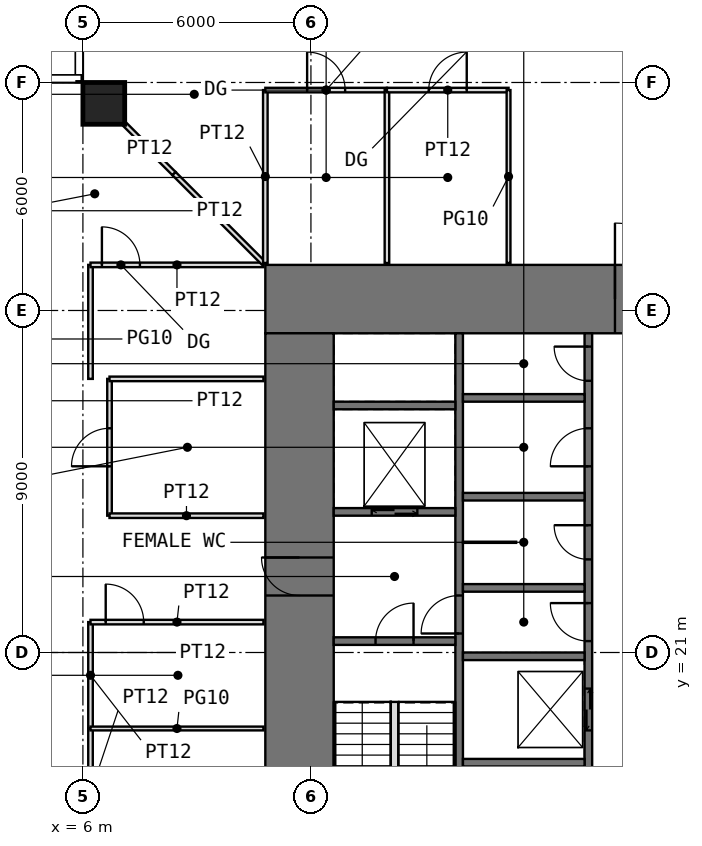
"""IFC4 building model, lengths in metres.
Left out: names, types, materials, properties, quantities, classifications, styles, units other than length and angle.
Written with IfcOpenShell. Run it as: python <this file> out.ifc"""

import sys

from ifc_helpers import new_model, si_unit, direction, frame, frame_2d, origin, origin_2d, place, context, subcontext, project, spatial, rectangle, extrude, element, fill, save


model = new_model("IFC4")
c1 = context("Model", 3, precision=1e-05, world=origin(), true_north=direction((0.0, 1.0)))
c2 = subcontext(c1, "Body", "Model", "MODEL_VIEW")
j1 = project(units=[si_unit("LENGTHUNIT", "METRE"), si_unit("PLANEANGLEUNIT", "RADIAN")], contexts=[c1])
p1 = place(None, origin())
s1 = spatial("IfcSite", under=j1, at=p1, CompositionType="ELEMENT")
p2 = place(p1, origin())
s2 = spatial("IfcBuilding", under=s1, at=p2, CompositionType="ELEMENT")
p3 = place(p2, frame((0.0, 0.0, 82.5)))
s3 = spatial("IfcBuildingStorey", under=s2, at=p3, CompositionType="ELEMENT", Elevation=82.5)
p4 = place(p3, frame((6.55, 35.45, 0.0), z_axis=(0.0, 0.0, 1.0), x_axis=(1.0, 0.0, 0.0)))
e1 = element("IfcColumn", 1, at=p4, inside=s3, PredefinedType="COLUMN", context=c2, shape_type="SweptSolid", body=[
    extrude(rectangle(XDim=1.1, YDim=1.1, at=origin_2d()), origin(), (0.0, 0.0, 1.0), 4.0),
])
p5 = place(p3, frame((10.8, 30.3, -0.05), z_axis=(0.0, 0.0, 1.0), x_axis=(1.0, 0.0, 0.0)))
e2 = element("IfcWall", 2, at=p5, inside=s3, PredefinedType="SHEAR", context=c2, shape_type="SweptSolid", body=[
    extrude(rectangle(XDim=20.4, YDim=1.8, at=frame_2d((10.2, 0.0))), origin(), (0.0, 0.0, 1.0), 3.8),
])
p6 = place(p5, frame((9.2, 0.0, 0.05)))
e3 = element("IfcOpeningElement", 3, at=p6, cuts=e2, PredefinedType="OPENING", context=c2, shape_type="SweptSolid", body=[
    extrude(rectangle(XDim=2.0, YDim=2.2, at=frame_2d((1.0, 1.1))), frame((0.0, 0.91, 0.0), z_axis=(0.0, -1.0, 0.0), x_axis=(1.0, 0.0, 0.0)), (0.0, 0.0, 1.0), 1.82),
])
p7 = place(p3, frame((11.7, 12.6, -0.05), z_axis=(0.0, 0.0, 1.0), x_axis=(0.0, 1.0, 0.0)))
e4 = element("IfcWall", 4, at=p7, inside=s3, PredefinedType="SHEAR", context=c2, shape_type="SweptSolid", body=[
    extrude(rectangle(XDim=16.8, YDim=1.8, at=frame_2d((8.4, 0.0))), origin(), (0.0, 0.0, 1.0), 3.8),
])
p8 = place(p7, frame((9.9, 0.0, 0.05)))
e5 = element("IfcOpeningElement", 5, at=p8, cuts=e4, PredefinedType="OPENING", context=c2, shape_type="SweptSolid", body=[
    extrude(rectangle(XDim=1.0, YDim=2.2, at=frame_2d((0.5, 1.1))), frame((0.0, 0.91, 0.0), z_axis=(0.0, -1.0, 0.0), x_axis=(1.0, 0.0, 0.0)), (0.0, 0.0, 1.0), 1.82),
])
p9 = place(p3, frame((15.9, 12.6, -0.05), z_axis=(0.0, 0.0, 1.0), x_axis=(0.0, 1.0, 0.0)))
e6 = element("IfcWall", 6, at=p9, inside=s3, PredefinedType="SHEAR", context=c2, shape_type="SweptSolid", body=[
    extrude(rectangle(XDim=16.8, YDim=0.2, at=frame_2d((8.4, 0.0))), origin(), (0.0, 0.0, 1.0), 3.8),
])
p10 = place(p9, frame((8.9, 0.0, 0.05)))
e7 = element("IfcOpeningElement", 7, at=p10, cuts=e6, PredefinedType="OPENING", context=c2, shape_type="SweptSolid", body=[
    extrude(rectangle(XDim=1.0, YDim=2.2, at=frame_2d((0.5, 1.1))), frame((0.0, 0.11, 0.0), z_axis=(0.0, -1.0, 0.0), x_axis=(1.0, 0.0, 0.0)), (0.0, 0.0, 1.0), 0.22),
])
p11 = place(p3, frame((19.3, 12.6, -0.05), z_axis=(0.0, 0.0, 1.0), x_axis=(0.0, 1.0, 0.0)))
e8 = element("IfcWall", 8, at=p11, inside=s3, PredefinedType="SHEAR", context=c2, shape_type="SweptSolid", body=[
    extrude(rectangle(XDim=16.8, YDim=0.2, at=frame_2d((8.4, 0.0))), origin(), (0.0, 0.0, 1.0), 3.8),
])
p12 = place(p11, frame((8.7, 0.0, 0.05)))
e9 = element("IfcOpeningElement", 9, at=p12, cuts=e8, PredefinedType="OPENING", context=c2, shape_type="SweptSolid", body=[
    extrude(rectangle(XDim=1.0, YDim=2.2, at=frame_2d((0.5, 1.1))), frame((0.0, 0.11, 0.0), z_axis=(0.0, -1.0, 0.0), x_axis=(1.0, 0.0, 0.0)), (0.0, 0.0, 1.0), 0.22),
])
p13 = place(p11, frame((10.85, 0.0, 0.05)))
e10 = element("IfcOpeningElement", 10, at=p13, cuts=e8, PredefinedType="OPENING", context=c2, shape_type="SweptSolid", body=[
    extrude(rectangle(XDim=0.9, YDim=2.2, at=frame_2d((0.45, 1.1))), frame((0.0, 0.11, 0.0), z_axis=(0.0, -1.0, 0.0), x_axis=(1.0, 0.0, 0.0)), (0.0, 0.0, 1.0), 0.22),
])
p14 = place(p11, frame((13.3, 0.0, 0.05)))
e11 = element("IfcOpeningElement", 11, at=p14, cuts=e8, PredefinedType="OPENING", context=c2, shape_type="SweptSolid", body=[
    extrude(rectangle(XDim=1.0, YDim=2.2, at=frame_2d((0.5, 1.1))), frame((0.0, 0.11, 0.0), z_axis=(0.0, -1.0, 0.0), x_axis=(1.0, 0.0, 0.0)), (0.0, 0.0, 1.0), 0.22),
])
p15 = place(p11, frame((15.55, 0.0, 0.05)))
e12 = element("IfcOpeningElement", 12, at=p15, cuts=e8, PredefinedType="OPENING", context=c2, shape_type="SweptSolid", body=[
    extrude(rectangle(XDim=0.9, YDim=2.2, at=frame_2d((0.45, 1.1))), frame((0.0, 0.11, 0.0), z_axis=(0.0, -1.0, 0.0), x_axis=(1.0, 0.0, 0.0)), (0.0, 0.0, 1.0), 0.22),
])
p16 = place(p11, frame((0.75, 0.0, 0.05)))
e13 = element("IfcOpeningElement", 13, at=p16, cuts=e8, PredefinedType="OPENING", context=c2, shape_type="SweptSolid", body=[
    extrude(rectangle(XDim=1.1, YDim=2.2, at=frame_2d((0.55, 1.1))), frame((0.0, 0.11, 0.0), z_axis=(0.0, -1.0, 0.0), x_axis=(1.0, 0.0, 0.0)), (0.0, 0.0, 1.0), 0.22),
])
p17 = place(p11, frame((3.55, 0.0, 0.05)))
e14 = element("IfcOpeningElement", 14, at=p17, cuts=e8, PredefinedType="OPENING", context=c2, shape_type="SweptSolid", body=[
    extrude(rectangle(XDim=1.1, YDim=2.2, at=frame_2d((0.55, 1.1))), frame((0.0, 0.11, 0.0), z_axis=(0.0, -1.0, 0.0), x_axis=(1.0, 0.0, 0.0)), (0.0, 0.0, 1.0), 0.22),
])
p18 = place(p11, frame((6.35, 0.0, 0.05)))
e15 = element("IfcOpeningElement", 15, at=p18, cuts=e8, PredefinedType="OPENING", context=c2, shape_type="SweptSolid", body=[
    extrude(rectangle(XDim=1.1, YDim=2.2, at=frame_2d((0.55, 1.1))), frame((0.0, 0.11, 0.0), z_axis=(0.0, -1.0, 0.0), x_axis=(1.0, 0.0, 0.0)), (0.0, 0.0, 1.0), 0.22),
])
p19 = place(p3, frame((12.6, 21.3, -0.05), z_axis=(0.0, 0.0, 1.0), x_axis=(1.0, 0.0, 0.0)))
e16 = element("IfcWall", 16, at=p19, inside=s3, PredefinedType="SHEAR", context=c2, shape_type="SweptSolid", body=[
    extrude(rectangle(XDim=3.2, YDim=0.2, at=frame_2d((1.6, 0.0))), origin(), (0.0, 0.0, 1.0), 3.8),
])
p20 = place(p19, frame((1.1, 0.0, 0.05)))
e17 = element("IfcOpeningElement", 17, at=p20, cuts=e16, PredefinedType="OPENING", context=c2, shape_type="SweptSolid", body=[
    extrude(rectangle(XDim=1.0, YDim=2.2, at=frame_2d((0.5, 1.1))), frame((0.0, 0.11, 0.0), z_axis=(0.0, -1.0, 0.0), x_axis=(1.0, 0.0, 0.0)), (0.0, 0.0, 1.0), 0.22),
])
p21 = place(p3, frame((12.6, 24.7, -0.05), z_axis=(0.0, 0.0, 1.0), x_axis=(1.0, 0.0, 0.0)))
e18 = element("IfcWall", 18, at=p21, inside=s3, PredefinedType="SHEAR", context=c2, shape_type="SweptSolid", body=[
    extrude(rectangle(XDim=3.2, YDim=0.2, at=frame_2d((1.6, 0.0))), origin(), (0.0, 0.0, 1.0), 3.8),
])
p22 = place(p21, frame((1.0, 0.0, 0.05)))
e19 = element("IfcOpeningElement", 19, at=p22, cuts=e18, PredefinedType="OPENING", context=c2, shape_type="SweptSolid", body=[
    extrude(rectangle(XDim=1.2, YDim=2.2, at=frame_2d((0.6, 1.1))), frame((0.0, 0.11, 0.0), z_axis=(0.0, -1.0, 0.0), x_axis=(1.0, 0.0, 0.0)), (0.0, 0.0, 1.0), 0.22),
])
for number, where, z_axis, x_axis in (
    (20, (12.6, 27.5, -0.05), (0.0, 0.0, 1.0), (1.0, 0.0, 0.0)),
    (21, (16.0, 18.1, -0.05), (0.0, 0.0, 1.0), (1.0, 0.0, 0.0)),
    (22, (16.0, 20.9, -0.05), (0.0, 0.0, 1.0), (1.0, 0.0, 0.0)),
    (23, (16.0, 22.7, -0.05), (0.0, 0.0, 1.0), (1.0, 0.0, 0.0)),
    (24, (16.0, 25.1, -0.05), (0.0, 0.0, 1.0), (1.0, 0.0, 0.0)),
    (25, (16.0, 27.7, -0.05), (0.0, 0.0, 1.0), (1.0, 0.0, 0.0)),
):
    element("IfcWall", number, at=place(p3, frame(where, z_axis=z_axis, x_axis=x_axis)), inside=s3, PredefinedType="SHEAR", context=c2, shape_type="SweptSolid", body=[
        extrude(rectangle(XDim=3.2, YDim=0.2, at=frame_2d((1.6, 0.0))), origin(), (0.0, 0.0, 1.0), 3.8),
    ])
p23 = place(p3, frame((16.0, 23.9, 0.0), z_axis=(0.0, 0.0, 1.0), x_axis=(1.0, 0.0, 0.0)))
e26 = element("IfcWall", 26, at=p23, inside=s3, PredefinedType="PARTITIONING", context=c2, shape_type="SweptSolid", body=[
    extrude(rectangle(XDim=1.4, YDim=0.03, at=frame_2d((0.7, 0.0))), origin(), (0.0, 0.0, 1.0), 3.55),
])
p24 = place(p3, frame((6.2, 15.6, 0.0), z_axis=(0.0, 0.0, 1.0), x_axis=(0.0, 1.0, 0.0)))
e27 = element("IfcWall", 27, at=p24, inside=s3, PredefinedType="PARTITIONING", context=c2, shape_type="SweptSolid", body=[
    extrude(rectangle(XDim=3.4, YDim=0.12, at=frame_2d((1.7, 0.0))), origin(), (0.0, 0.0, 1.0), 3.55),
])
p25 = place(p24, frame((1.2, 0.0, 0.0)))
e28 = element("IfcOpeningElement", 28, at=p25, cuts=e27, PredefinedType="OPENING", context=c2, shape_type="SweptSolid", body=[
    extrude(rectangle(XDim=1.0, YDim=2.4, at=frame_2d((0.5, 1.2))), frame((0.0, 0.07, 0.0), z_axis=(0.0, -1.0, 0.0), x_axis=(1.0, 0.0, 0.0)), (0.0, 0.0, 1.0), 0.14),
])
p26 = place(p3, frame((6.2, 19.0, 0.0), z_axis=(0.0, 0.0, 1.0), x_axis=(0.0, 1.0, 0.0)))
e29 = element("IfcWall", 29, at=p26, inside=s3, PredefinedType="PARTITIONING", context=c2, shape_type="SweptSolid", body=[
    extrude(rectangle(XDim=2.8, YDim=0.12, at=frame_2d((1.4, 0.0))), origin(), (0.0, 0.0, 1.0), 3.55),
])
p27 = place(p3, frame((6.2, 19.0, 0.0), z_axis=(0.0, 0.0, 1.0), x_axis=(1.0, 0.0, 0.0)))
e30 = element("IfcWall", 30, at=p27, inside=s3, PredefinedType="PARTITIONING", context=c2, shape_type="SweptSolid", body=[
    extrude(rectangle(XDim=4.55, YDim=0.1, at=frame_2d((2.275, 0.0))), origin(), (0.0, 0.0, 1.0), 3.55),
])
p28 = place(p3, frame((6.2, 21.8, 0.0), z_axis=(0.0, 0.0, 1.0), x_axis=(1.0, 0.0, 0.0)))
e31 = element("IfcWall", 31, at=p28, inside=s3, PredefinedType="PARTITIONING", context=c2, shape_type="SweptSolid", body=[
    extrude(rectangle(XDim=4.55, YDim=0.12, at=frame_2d((2.275, 0.0))), origin(), (0.0, 0.0, 1.0), 3.55),
])
p29 = place(p28, frame((0.4, 0.0, 0.0)))
e32 = element("IfcOpeningElement", 32, at=p29, cuts=e31, PredefinedType="OPENING", context=c2, shape_type="SweptSolid", body=[
    extrude(rectangle(XDim=1.0, YDim=2.4, at=frame_2d((0.5, 1.2))), frame((0.0, 0.07, 0.0), z_axis=(0.0, -1.0, 0.0), x_axis=(1.0, 0.0, 0.0)), (0.0, 0.0, 1.0), 0.14),
])
p30 = place(p3, frame((6.2, 28.2, 0.0), z_axis=(0.0, 0.0, 1.0), x_axis=(0.0, 1.0, 0.0)))
e33 = element("IfcWall", 33, at=p30, inside=s3, PredefinedType="PARTITIONING", context=c2, shape_type="SweptSolid", body=[
    extrude(rectangle(XDim=3.0, YDim=0.12, at=frame_2d((1.5, 0.0))), origin(), (0.0, 0.0, 1.0), 3.55),
])
p31 = place(p3, frame((6.2, 31.2, 0.0), z_axis=(0.0, 0.0, 1.0), x_axis=(1.0, 0.0, 0.0)))
e34 = element("IfcWall", 34, at=p31, inside=s3, PredefinedType="PARTITIONING", context=c2, shape_type="SweptSolid", body=[
    extrude(rectangle(XDim=4.55, YDim=0.12, at=frame_2d((2.275, 0.0))), origin(), (0.0, 0.0, 1.0), 3.55),
])
p32 = place(p31, frame((0.3, 0.0, 0.0)))
e35 = element("IfcOpeningElement", 35, at=p32, cuts=e34, PredefinedType="OPENING", context=c2, shape_type="SweptSolid", body=[
    extrude(rectangle(XDim=1.0, YDim=2.4, at=frame_2d((0.5, 1.2))), frame((0.0, 0.07, 0.0), z_axis=(0.0, -1.0, 0.0), x_axis=(1.0, 0.0, 0.0)), (0.0, 0.0, 1.0), 0.14),
])
p33 = place(p3, frame((6.7, 24.6, 0.0), z_axis=(0.0, 0.0, 1.0), x_axis=(0.0, 1.0, 0.0)))
e36 = element("IfcWall", 36, at=p33, inside=s3, PredefinedType="PARTITIONING", context=c2, shape_type="SweptSolid", body=[
    extrude(rectangle(XDim=3.6, YDim=0.12, at=frame_2d((1.8, 0.0))), origin(), (0.0, 0.0, 1.0), 3.55),
])
p34 = place(p33, frame((1.3, 0.0, 0.0)))
e37 = element("IfcOpeningElement", 37, at=p34, cuts=e36, PredefinedType="OPENING", context=c2, shape_type="SweptSolid", body=[
    extrude(rectangle(XDim=1.0, YDim=2.2, at=frame_2d((0.5, 1.1))), frame((0.0, 0.07, 0.0), z_axis=(0.0, -1.0, 0.0), x_axis=(1.0, 0.0, 0.0)), (0.0, 0.0, 1.0), 0.14),
])
for number, where, z_axis, x_axis in (
    (38, (6.7, 24.6, 0.0), (0.0, 0.0, 1.0), (1.0, 0.0, 0.0)),
    (39, (6.7, 28.2, 0.0), (0.0, 0.0, 1.0), (1.0, 0.0, 0.0)),
):
    element("IfcWall", number, at=place(p3, frame(where, z_axis=z_axis, x_axis=x_axis)), inside=s3, PredefinedType="PARTITIONING", context=c2, shape_type="SweptSolid", body=[
        extrude(rectangle(XDim=4.05, YDim=0.12, at=frame_2d((2.025, 0.0))), origin(), (0.0, 0.0, 1.0), 3.55),
    ])
p35 = place(p3, frame((7.11, 34.89, 0.0), z_axis=(0.0, 0.0, 1.0), x_axis=(0.707106781187, -0.707106781187, 0.0)))
e40 = element("IfcWall", 40, at=p35, inside=s3, PredefinedType="PARTITIONING", context=c2, shape_type="SweptSolid", body=[
    extrude(rectangle(XDim=1.822, YDim=0.12, at=frame_2d((0.911, 0.0))), origin(), (0.0, 0.0, 1.0), 3.55),
])
p36 = place(p3, frame((8.398, 33.602, 0.0), z_axis=(0.0, 0.0, 1.0), x_axis=(0.707106781187, -0.707106781187, 0.0)))
e41 = element("IfcWall", 41, at=p36, inside=s3, PredefinedType="PARTITIONING", context=c2, shape_type="SweptSolid", body=[
    extrude(rectangle(XDim=3.346, YDim=0.12, at=frame_2d((1.673, 0.0))), origin(), (0.0, 0.0, 1.0), 3.55),
])
p37 = place(p3, frame((10.8, 31.25, 0.0), z_axis=(0.0, 0.0, 1.0), x_axis=(0.0, 1.0, 0.0)))
e42 = element("IfcWall", 42, at=p37, inside=s3, PredefinedType="PARTITIONING", context=c2, shape_type="SweptSolid", body=[
    extrude(rectangle(XDim=4.55, YDim=0.12, at=frame_2d((2.275, 0.0))), origin(), (0.0, 0.0, 1.0), 3.55),
])
p38 = place(p3, frame((10.8, 35.8, 0.0), z_axis=(0.0, 0.0, 1.0), x_axis=(1.0, 0.0, 0.0)))
e43 = element("IfcWall", 43, at=p38, inside=s3, PredefinedType="PARTITIONING", context=c2, shape_type="SweptSolid", body=[
    extrude(rectangle(XDim=3.2, YDim=0.12, at=frame_2d((1.6, 0.0))), origin(), (0.0, 0.0, 1.0), 3.55),
])
p39 = place(p38, frame((1.1, 0.0, 0.0)))
e44 = element("IfcOpeningElement", 44, at=p39, cuts=e43, PredefinedType="OPENING", context=c2, shape_type="SweptSolid", body=[
    extrude(rectangle(XDim=1.0, YDim=2.4, at=frame_2d((0.5, 1.2))), frame((0.0, 0.07, 0.0), z_axis=(0.0, -1.0, 0.0), x_axis=(1.0, 0.0, 0.0)), (0.0, 0.0, 1.0), 0.14),
])
p40 = place(p3, frame((14.0, 31.25, 0.0), z_axis=(0.0, 0.0, 1.0), x_axis=(0.0, 1.0, 0.0)))
e45 = element("IfcWall", 45, at=p40, inside=s3, PredefinedType="PARTITIONING", context=c2, shape_type="SweptSolid", body=[
    extrude(rectangle(XDim=4.55, YDim=0.12, at=frame_2d((2.275, 0.0))), origin(), (0.0, 0.0, 1.0), 3.55),
])
p41 = place(p3, frame((14.0, 35.8, 0.0), z_axis=(0.0, 0.0, 1.0), x_axis=(1.0, 0.0, 0.0)))
e46 = element("IfcWall", 46, at=p41, inside=s3, PredefinedType="PARTITIONING", context=c2, shape_type="SweptSolid", body=[
    extrude(rectangle(XDim=3.2, YDim=0.12, at=frame_2d((1.6, 0.0))), origin(), (0.0, 0.0, 1.0), 3.55),
])
p42 = place(p41, frame((1.1, 0.0, 0.0)))
e47 = element("IfcOpeningElement", 47, at=p42, cuts=e46, PredefinedType="OPENING", context=c2, shape_type="SweptSolid", body=[
    extrude(rectangle(XDim=1.0, YDim=2.4, at=frame_2d((0.5, 1.2))), frame((0.0, 0.07, 0.0), z_axis=(0.0, -1.0, 0.0), x_axis=(1.0, 0.0, 0.0)), (0.0, 0.0, 1.0), 0.14),
])
p43 = place(p3, frame((17.2, 31.25, 0.0), z_axis=(0.0, 0.0, 1.0), x_axis=(0.0, 1.0, 0.0)))
e48 = element("IfcWall", 48, at=p43, inside=s3, PredefinedType="PARTITIONING", context=c2, shape_type="SweptSolid", body=[
    extrude(rectangle(XDim=4.55, YDim=0.1, at=frame_2d((2.275, 0.0))), origin(), (0.0, 0.0, 1.0), 3.55),
])
p44 = place(p3, frame((14.2, 16.62, 0.0), z_axis=(0.0, 0.0, 1.0), x_axis=(0.0, 1.0, 0.0)))
e49 = element("IfcWall", 49, at=p44, inside=s3, PredefinedType="PARTITIONING", context=c2, shape_type="SweptSolid", body=[
    extrude(rectangle(XDim=3.08, YDim=0.2, at=frame_2d((1.54, 0.0))), origin(), (0.0, 0.0, 1.0), 4.0),
])
p45 = place(p6, origin())
e50 = element("IfcDoor", 50, at=p45, inside=s3, OperationType="DOUBLE_DOOR_SINGLE_SWING", PredefinedType="DOOR", context=c2, shape_type="SweptSolid", body=[
    extrude(rectangle(XDim=2.0, YDim=2.2, at=frame_2d((1.0, 1.1))), frame((0.0, 0.025, 0.0), z_axis=(0.0, -1.0, 0.0), x_axis=(1.0, 0.0, 0.0)), (0.0, 0.0, 1.0), 0.05),
])
fill(e3, e50)
p46 = place(p8, origin())
e51 = element("IfcDoor", 51, at=p46, inside=s3, OperationType="SINGLE_SWING_RIGHT", PredefinedType="DOOR", context=c2, shape_type="SweptSolid", body=[
    extrude(rectangle(XDim=1.0, YDim=2.2, at=frame_2d((0.5, 1.1))), frame((0.0, 0.025, 0.0), z_axis=(0.0, -1.0, 0.0), x_axis=(1.0, 0.0, 0.0)), (0.0, 0.0, 1.0), 0.05),
])
fill(e5, e51)
p47 = place(p20, origin())
e52 = element("IfcDoor", 52, at=p47, inside=s3, OperationType="SINGLE_SWING_RIGHT", PredefinedType="DOOR", context=c2, shape_type="SweptSolid", body=[
    extrude(rectangle(XDim=1.0, YDim=2.2, at=frame_2d((0.5, 1.1))), frame((0.0, 0.025, 0.0), z_axis=(0.0, -1.0, 0.0), x_axis=(1.0, 0.0, 0.0)), (0.0, 0.0, 1.0), 0.05),
])
fill(e17, e52)
p48 = place(p10, origin())
e53 = element("IfcDoor", 53, at=p48, inside=s3, OperationType="SINGLE_SWING_LEFT", PredefinedType="DOOR", context=c2, shape_type="SweptSolid", body=[
    extrude(rectangle(XDim=1.0, YDim=2.2, at=frame_2d((0.5, 1.1))), frame((0.0, 0.025, 0.0), z_axis=(0.0, -1.0, 0.0), x_axis=(1.0, 0.0, 0.0)), (0.0, 0.0, 1.0), 0.05),
])
fill(e7, e53)
p49 = place(p12, origin())
e54 = element("IfcDoor", 54, at=p49, inside=s3, OperationType="SINGLE_SWING_RIGHT", PredefinedType="DOOR", context=c2, shape_type="SweptSolid", body=[
    extrude(rectangle(XDim=1.0, YDim=2.2, at=frame_2d((0.5, 1.1))), frame((0.0, 0.025, 0.0), z_axis=(0.0, -1.0, 0.0), x_axis=(1.0, 0.0, 0.0)), (0.0, 0.0, 1.0), 0.05),
])
fill(e9, e54)
p50 = place(p13, origin())
e55 = element("IfcDoor", 55, at=p50, inside=s3, OperationType="SINGLE_SWING_RIGHT", PredefinedType="DOOR", context=c2, shape_type="SweptSolid", body=[
    extrude(rectangle(XDim=0.9, YDim=2.2, at=frame_2d((0.45, 1.1))), frame((0.0, 0.025, 0.0), z_axis=(0.0, -1.0, 0.0), x_axis=(1.0, 0.0, 0.0)), (0.0, 0.0, 1.0), 0.05),
])
fill(e10, e55)
p51 = place(p14, origin())
e56 = element("IfcDoor", 56, at=p51, inside=s3, OperationType="SINGLE_SWING_LEFT", PredefinedType="DOOR", context=c2, shape_type="SweptSolid", body=[
    extrude(rectangle(XDim=1.0, YDim=2.2, at=frame_2d((0.5, 1.1))), frame((0.0, 0.025, 0.0), z_axis=(0.0, -1.0, 0.0), x_axis=(1.0, 0.0, 0.0)), (0.0, 0.0, 1.0), 0.05),
])
fill(e11, e56)
p52 = place(p15, origin())
e57 = element("IfcDoor", 57, at=p52, inside=s3, OperationType="SINGLE_SWING_RIGHT", PredefinedType="DOOR", context=c2, shape_type="SweptSolid", body=[
    extrude(rectangle(XDim=0.9, YDim=2.2, at=frame_2d((0.45, 1.1))), frame((0.0, 0.025, 0.0), z_axis=(0.0, -1.0, 0.0), x_axis=(1.0, 0.0, 0.0)), (0.0, 0.0, 1.0), 0.05),
])
fill(e12, e57)
p53 = place(p39, origin())
e58 = element("IfcDoor", 58, at=p53, inside=s3, OperationType="SINGLE_SWING_LEFT", PredefinedType="DOOR", context=c2, shape_type="SweptSolid", body=[
    extrude(rectangle(XDim=1.0, YDim=2.4, at=frame_2d((0.5, 1.2))), frame((0.0, 0.025, 0.0), z_axis=(0.0, -1.0, 0.0), x_axis=(1.0, 0.0, 0.0)), (0.0, 0.0, 1.0), 0.05),
])
fill(e44, e58)
p54 = place(p42, origin())
e59 = element("IfcDoor", 59, at=p54, inside=s3, OperationType="SINGLE_SWING_RIGHT", PredefinedType="DOOR", context=c2, shape_type="SweptSolid", body=[
    extrude(rectangle(XDim=1.0, YDim=2.4, at=frame_2d((0.5, 1.2))), frame((0.0, 0.025, 0.0), z_axis=(0.0, -1.0, 0.0), x_axis=(1.0, 0.0, 0.0)), (0.0, 0.0, 1.0), 0.05),
])
fill(e47, e59)
p55 = place(p34, origin())
e60 = element("IfcDoor", 60, at=p55, inside=s3, OperationType="SINGLE_SWING_LEFT", PredefinedType="DOOR", context=c2, shape_type="SweptSolid", body=[
    extrude(rectangle(XDim=1.0, YDim=2.2, at=frame_2d((0.5, 1.1))), frame((0.0, 0.025, 0.0), z_axis=(0.0, -1.0, 0.0), x_axis=(1.0, 0.0, 0.0)), (0.0, 0.0, 1.0), 0.05),
])
fill(e37, e60)
p56 = place(p32, origin())
e61 = element("IfcDoor", 61, at=p56, inside=s3, OperationType="SINGLE_SWING_LEFT", PredefinedType="DOOR", context=c2, shape_type="SweptSolid", body=[
    extrude(rectangle(XDim=1.0, YDim=2.4, at=frame_2d((0.5, 1.2))), frame((0.0, 0.025, 0.0), z_axis=(0.0, -1.0, 0.0), x_axis=(1.0, 0.0, 0.0)), (0.0, 0.0, 1.0), 0.05),
])
fill(e35, e61)
p57 = place(p29, origin())
e62 = element("IfcDoor", 62, at=p57, inside=s3, OperationType="SINGLE_SWING_LEFT", PredefinedType="DOOR", context=c2, shape_type="SweptSolid", body=[
    extrude(rectangle(XDim=1.0, YDim=2.4, at=frame_2d((0.5, 1.2))), frame((0.0, 0.025, 0.0), z_axis=(0.0, -1.0, 0.0), x_axis=(1.0, 0.0, 0.0)), (0.0, 0.0, 1.0), 0.05),
])
fill(e32, e62)
p58 = place(p18, origin())
e63 = element("IfcDoor", 63, at=p58, inside=s3, OperationType="DOUBLE_DOOR_SLIDING", PredefinedType="DOOR", context=c2, shape_type="SweptSolid", body=[
    extrude(rectangle(XDim=1.1, YDim=2.2, at=frame_2d((0.55, 1.1))), frame((0.0, 0.025, 0.0), z_axis=(0.0, -1.0, 0.0), x_axis=(1.0, 0.0, 0.0)), (0.0, 0.0, 1.0), 0.05),
])
fill(e15, e63)
p59 = place(p22, origin())
e64 = element("IfcDoor", 64, at=p59, inside=s3, OperationType="DOUBLE_DOOR_SLIDING", PredefinedType="DOOR", context=c2, shape_type="SweptSolid", body=[
    extrude(rectangle(XDim=1.2, YDim=2.2, at=frame_2d((0.6, 1.1))), frame((0.0, 0.025, 0.0), z_axis=(0.0, -1.0, 0.0), x_axis=(1.0, 0.0, 0.0)), (0.0, 0.0, 1.0), 0.05),
])
fill(e19, e64)
save(model, sys.argv[1])
